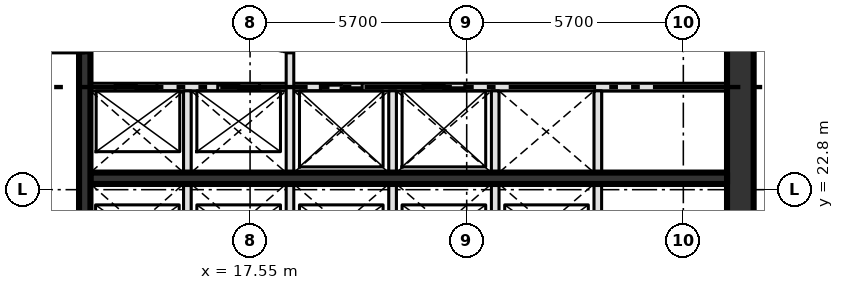
"""IFC4 building model, lengths in metres.
Left out: names, types, materials, properties, quantities, classifications, styles, units other than length and angle.
Written with IfcOpenShell. Run it as: python <this file> out.ifc"""

import sys

from ifc_helpers import new_model, si_unit, direction, frame, frame_2d, origin, place, context, subcontext, project, spatial, rectangle, extrude, element, fill, save


model = new_model("IFC4")
c1 = context("Model", 3, precision=1e-05, world=origin(), true_north=direction((0.0, 1.0)))
c2 = subcontext(c1, "Body", "Model", "MODEL_VIEW")
j1 = project(units=[si_unit("LENGTHUNIT", "METRE"), si_unit("PLANEANGLEUNIT", "RADIAN")], contexts=[c1])
p1 = place(None, origin())
s1 = spatial("IfcSite", under=j1, at=p1, CompositionType="ELEMENT")
p2 = place(p1, origin())
s2 = spatial("IfcBuilding", under=s1, at=p2, CompositionType="ELEMENT")
p3 = place(p2, frame((0.0, 0.0, 246.6)))
s3 = spatial("IfcBuildingStorey", under=s2, at=p3, CompositionType="ELEMENT", Elevation=246.6)
p4 = place(p3, frame((30.45, 14.8, -0.3), z_axis=(0.0, 0.0, 1.0), x_axis=(0.0, 1.0, 0.0)))
e1 = element("IfcWall", 1, at=p4, inside=s3, PredefinedType="SHEAR", context=c2, shape_type="SweptSolid", body=[
    extrude(rectangle(XDim=20.9, YDim=0.7, at=frame_2d((10.45, 0.0))), origin(), (0.0, 0.0, 1.0), 4.2),
])
p5 = place(p3, frame((13.35, 23.1, 0.0), z_axis=(0.0, 0.0, 1.0), x_axis=(1.0, 0.0, 0.0)))
e2 = element("IfcWall", 2, at=p5, inside=s3, PredefinedType="SHEAR", context=c2, shape_type="SweptSolid", body=[
    extrude(rectangle(XDim=16.75, YDim=0.3, at=frame_2d((8.375, 0.0))), origin(), (0.0, 0.0, 1.0), 3.9),
])
p6 = place(p3, frame((13.35, 25.5, 0.0), z_axis=(0.0, 0.0, 1.0), x_axis=(1.0, 0.0, 0.0)))
e3 = element("IfcWall", 3, at=p6, inside=s3, PredefinedType="SOLIDWALL", context=c2, shape_type="SweptSolid", body=[
    extrude(rectangle(XDim=16.75, YDim=0.2, at=frame_2d((8.375, 0.0))), origin(), (0.0, 0.0, 1.0), 3.9),
])
p7 = place(p6, frame((0.65, 0.0, 0.0)))
e4 = element("IfcOpeningElement", 4, at=p7, cuts=e3, PredefinedType="OPENING", context=c2, shape_type="SweptSolid", body=[
    extrude(rectangle(XDim=1.1, YDim=2.1, at=frame_2d((0.55, 1.05))), frame((0.0, 0.11, 0.0), z_axis=(0.0, -1.0, 0.0), x_axis=(1.0, 0.0, 0.0)), (0.0, 0.0, 1.0), 0.22),
])
p8 = place(p6, frame((3.35, 0.0, 0.0)))
e5 = element("IfcOpeningElement", 5, at=p8, cuts=e3, PredefinedType="OPENING", context=c2, shape_type="SweptSolid", body=[
    extrude(rectangle(XDim=1.1, YDim=2.1, at=frame_2d((0.55, 1.05))), frame((0.0, 0.11, 0.0), z_axis=(0.0, -1.0, 0.0), x_axis=(1.0, 0.0, 0.0)), (0.0, 0.0, 1.0), 0.22),
])
p9 = place(p6, frame((6.05, 0.0, 0.0)))
e6 = element("IfcOpeningElement", 6, at=p9, cuts=e3, PredefinedType="OPENING", context=c2, shape_type="SweptSolid", body=[
    extrude(rectangle(XDim=1.1, YDim=2.1, at=frame_2d((0.55, 1.05))), frame((0.0, 0.11, 0.0), z_axis=(0.0, -1.0, 0.0), x_axis=(1.0, 0.0, 0.0)), (0.0, 0.0, 1.0), 0.22),
])
p10 = place(p6, frame((8.75, 0.0, 0.0)))
e7 = element("IfcOpeningElement", 7, at=p10, cuts=e3, PredefinedType="OPENING", context=c2, shape_type="SweptSolid", body=[
    extrude(rectangle(XDim=1.1, YDim=2.1, at=frame_2d((0.55, 1.05))), frame((0.0, 0.11, 0.0), z_axis=(0.0, -1.0, 0.0), x_axis=(1.0, 0.0, 0.0)), (0.0, 0.0, 1.0), 0.22),
])
p11 = place(p3, frame((13.2, 14.8, 0.0), z_axis=(0.0, 0.0, 1.0), x_axis=(0.0, 1.0, 0.0)))
e8 = element("IfcWall", 8, at=p11, inside=s3, PredefinedType="SHEAR", context=c2, shape_type="SweptSolid", body=[
    extrude(rectangle(XDim=20.9, YDim=0.3, at=frame_2d((10.45, 0.0))), origin(), (0.0, 0.0, 1.0), 3.9),
])
p12 = place(p11, frame((3.5, 0.0, 0.0)))
e9 = element("IfcOpeningElement", 9, at=p12, cuts=e8, PredefinedType="OPENING", context=c2, shape_type="SweptSolid", body=[
    extrude(rectangle(XDim=1.8, YDim=2.1, at=frame_2d((0.9, 1.05))), frame((0.0, 0.16, 0.0), z_axis=(0.0, -1.0, 0.0), x_axis=(1.0, 0.0, 0.0)), (0.0, 0.0, 1.0), 0.32),
])
p13 = place(p11, frame((11.6, 0.0, 0.0)))
e10 = element("IfcOpeningElement", 10, at=p13, cuts=e8, PredefinedType="OPENING", context=c2, shape_type="SweptSolid", body=[
    extrude(rectangle(XDim=1.2, YDim=2.1, at=frame_2d((0.6, 1.05))), frame((0.0, 0.16, 0.0), z_axis=(0.0, -1.0, 0.0), x_axis=(1.0, 0.0, 0.0)), (0.0, 0.0, 1.0), 0.32),
])
p14 = place(p3, frame((15.9, 20.8, 0.0), z_axis=(0.0, 0.0, 1.0), x_axis=(0.0, 1.0, 0.0)))
e11 = element("IfcWall", 11, at=p14, inside=s3, PredefinedType="SOLIDWALL", context=c2, shape_type="SweptSolid", body=[
    extrude(rectangle(XDim=4.6, YDim=0.2, at=frame_2d((2.3, 0.0))), origin(), (0.0, 0.0, 1.0), 3.9),
])
p15 = place(p3, frame((18.6, 20.8, 0.0), z_axis=(0.0, 0.0, 1.0), x_axis=(0.0, 1.0, 0.0)))
e12 = element("IfcWall", 12, at=p15, inside=s3, PredefinedType="SOLIDWALL", context=c2, shape_type="SweptSolid", body=[
    extrude(rectangle(XDim=7.6, YDim=0.2, at=frame_2d((3.8, 0.0))), origin(), (0.0, 0.0, 1.0), 3.9),
])
p16 = place(p15, frame((5.6, 0.0, 0.0)))
e13 = element("IfcOpeningElement", 13, at=p16, cuts=e12, PredefinedType="OPENING", context=c2, shape_type="SweptSolid", body=[
    extrude(rectangle(XDim=1.2, YDim=2.1, at=frame_2d((0.6, 1.05))), frame((0.0, 0.11, 0.0), z_axis=(0.0, -1.0, 0.0), x_axis=(1.0, 0.0, 0.0)), (0.0, 0.0, 1.0), 0.22),
])
for number, where, z_axis, x_axis in (
    (14, (21.3, 20.8, 0.0), (0.0, 0.0, 1.0), (0.0, 1.0, 0.0)),
    (15, (24.0, 20.8, 0.0), (0.0, 0.0, 1.0), (0.0, 1.0, 0.0)),
    (16, (26.7, 20.8, 0.0), (0.0, 0.0, 1.0), (0.0, 1.0, 0.0)),
):
    element("IfcWall", number, at=place(p3, frame(where, z_axis=z_axis, x_axis=x_axis)), inside=s3, PredefinedType="SOLIDWALL", context=c2, shape_type="SweptSolid", body=[
        extrude(rectangle(XDim=4.6, YDim=0.2, at=frame_2d((2.3, 0.0))), origin(), (0.0, 0.0, 1.0), 3.9),
    ])
p17 = place(p7, origin())
e17 = element("IfcDoor", 17, at=p17, inside=s3, OperationType="SLIDING_TO_LEFT", PredefinedType="DOOR", context=c2, shape_type="SweptSolid", body=[
    extrude(rectangle(XDim=1.1, YDim=2.1, at=frame_2d((0.55, 1.05))), frame((0.0, 0.025, 0.0), z_axis=(0.0, -1.0, 0.0), x_axis=(1.0, 0.0, 0.0)), (0.0, 0.0, 1.0), 0.05),
])
fill(e4, e17)
p18 = place(p8, origin())
e18 = element("IfcDoor", 18, at=p18, inside=s3, OperationType="SLIDING_TO_LEFT", PredefinedType="DOOR", context=c2, shape_type="SweptSolid", body=[
    extrude(rectangle(XDim=1.1, YDim=2.1, at=frame_2d((0.55, 1.05))), frame((0.0, 0.025, 0.0), z_axis=(0.0, -1.0, 0.0), x_axis=(1.0, 0.0, 0.0)), (0.0, 0.0, 1.0), 0.05),
])
fill(e5, e18)
p19 = place(p9, origin())
e19 = element("IfcDoor", 19, at=p19, inside=s3, OperationType="SLIDING_TO_LEFT", PredefinedType="DOOR", context=c2, shape_type="SweptSolid", body=[
    extrude(rectangle(XDim=1.1, YDim=2.1, at=frame_2d((0.55, 1.05))), frame((0.0, 0.025, 0.0), z_axis=(0.0, -1.0, 0.0), x_axis=(1.0, 0.0, 0.0)), (0.0, 0.0, 1.0), 0.05),
])
fill(e6, e19)
p20 = place(p10, origin())
e20 = element("IfcDoor", 20, at=p20, inside=s3, OperationType="SLIDING_TO_LEFT", PredefinedType="DOOR", context=c2, shape_type="SweptSolid", body=[
    extrude(rectangle(XDim=1.1, YDim=2.1, at=frame_2d((0.55, 1.05))), frame((0.0, 0.025, 0.0), z_axis=(0.0, -1.0, 0.0), x_axis=(1.0, 0.0, 0.0)), (0.0, 0.0, 1.0), 0.05),
])
fill(e7, e20)
save(model, sys.argv[1])
